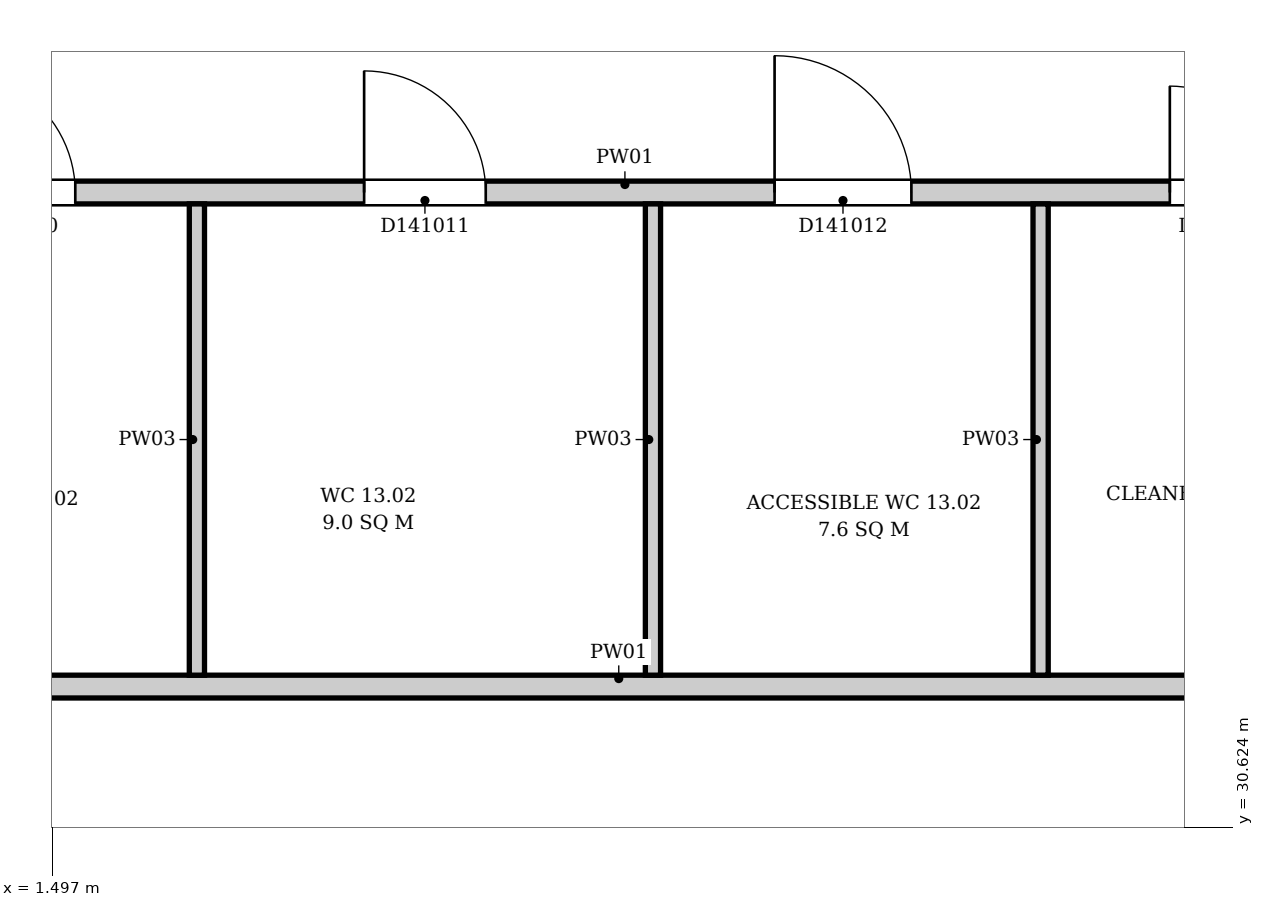
"""IFC4 building model, lengths in metres.
Left out: names, types, materials, properties, quantities, classifications, styles, units other than length and angle.
Written with IfcOpenShell. Run it as: python <this file> out.ifc"""

import sys

from ifc_helpers import new_model, si_unit, direction, frame, frame_2d, origin, place, context, subcontext, project, spatial, rectangle, extrude, element, fill, save


model = new_model("IFC4")
c1 = context("Model", 3, precision=1e-05, world=origin(), true_north=direction((0.0, 1.0)))
c2 = subcontext(c1, "Body", "Model", "MODEL_VIEW")
j1 = project(units=[si_unit("LENGTHUNIT", "METRE"), si_unit("PLANEANGLEUNIT", "RADIAN")], contexts=[c1])
p1 = place(None, origin())
s1 = spatial("IfcSite", under=j1, at=p1, CompositionType="ELEMENT")
p2 = place(p1, origin())
s2 = spatial("IfcBuilding", under=s1, at=p2, CompositionType="ELEMENT")
p3 = place(p2, frame((0.0, 0.0, 65.5)))
s3 = spatial("IfcBuildingStorey", under=s2, at=p3, CompositionType="ELEMENT", Elevation=65.5)
p4 = place(p3, frame((0.056, 31.55, 0.0), z_axis=(0.0, 0.0, 1.0), x_axis=(1.0, 0.0, 0.0)))
e1 = element("IfcWall", 1, at=p4, inside=s3, PredefinedType="PARTITIONING", context=c2, shape_type="SweptSolid", body=[
    extrude(rectangle(XDim=10.338, YDim=0.15, at=frame_2d((5.169, 0.0))), origin(), (0.0, 0.0, 1.0), 3.9),
])
p5 = place(p3, frame((0.056, 34.8, 0.0), z_axis=(0.0, 0.0, 1.0), x_axis=(1.0, 0.0, 0.0)))
e2 = element("IfcWall", 2, at=p5, inside=s3, PredefinedType="PARTITIONING", context=c2, shape_type="SweptSolid", body=[
    extrude(rectangle(XDim=10.419, YDim=0.15, at=frame_2d((5.209, 0.0))), origin(), (0.0, 0.0, 1.0), 3.9),
])
p6 = place(p5, frame((0.794, 0.0, 0.0)))
e3 = element("IfcOpeningElement", 3, at=p6, cuts=e2, PredefinedType="OPENING", context=c2, shape_type="SweptSolid", body=[
    extrude(rectangle(XDim=0.8, YDim=2.1, at=frame_2d((0.4, 1.05))), frame((0.0, 0.085, 0.0), z_axis=(0.0, -1.0, 0.0), x_axis=(1.0, 0.0, 0.0)), (0.0, 0.0, 1.0), 0.17),
])
p7 = place(p5, frame((3.494, 0.0, 0.0)))
e4 = element("IfcOpeningElement", 4, at=p7, cuts=e2, PredefinedType="OPENING", context=c2, shape_type="SweptSolid", body=[
    extrude(rectangle(XDim=0.8, YDim=2.1, at=frame_2d((0.4, 1.05))), frame((0.0, 0.085, 0.0), z_axis=(0.0, -1.0, 0.0), x_axis=(1.0, 0.0, 0.0)), (0.0, 0.0, 1.0), 0.17),
])
p8 = place(p5, frame((6.194, 0.0, 0.0)))
e5 = element("IfcOpeningElement", 5, at=p8, cuts=e2, PredefinedType="OPENING", context=c2, shape_type="SweptSolid", body=[
    extrude(rectangle(XDim=0.9, YDim=2.1, at=frame_2d((0.45, 1.05))), frame((0.0, 0.085, 0.0), z_axis=(0.0, -1.0, 0.0), x_axis=(1.0, 0.0, 0.0)), (0.0, 0.0, 1.0), 0.17),
])
p9 = place(p5, frame((8.794, 0.0, 0.0)))
e6 = element("IfcOpeningElement", 6, at=p9, cuts=e2, PredefinedType="OPENING", context=c2, shape_type="SweptSolid", body=[
    extrude(rectangle(XDim=0.7, YDim=2.1, at=frame_2d((0.35, 1.05))), frame((0.0, 0.085, 0.0), z_axis=(0.0, -1.0, 0.0), x_axis=(1.0, 0.0, 0.0)), (0.0, 0.0, 1.0), 0.17),
])
for number, where, z_axis, x_axis in (
    (7, (2.45, 31.625, 0.0), (0.0, 0.0, 1.0), (0.0, 1.0, 0.0)),
    (8, (5.45, 31.625, 0.0), (0.0, 0.0, 1.0), (0.0, 1.0, 0.0)),
    (9, (8.0, 31.625, 0.0), (0.0, 0.0, 1.0), (0.0, 1.0, 0.0)),
):
    element("IfcWall", number, at=place(p3, frame(where, z_axis=z_axis, x_axis=x_axis)), inside=s3, PredefinedType="PARTITIONING", context=c2, shape_type="SweptSolid", body=[
        extrude(rectangle(XDim=3.1, YDim=0.1, at=frame_2d((1.55, 0.0))), origin(), (0.0, 0.0, 1.0), 3.9),
    ])
p10 = place(p6, origin())
e10 = element("IfcDoor", 10, at=p10, inside=s3, OperationType="SINGLE_SWING_RIGHT", PredefinedType="DOOR", context=c2, shape_type="SweptSolid", body=[
    extrude(rectangle(XDim=0.8, YDim=2.1, at=frame_2d((0.4, 1.05))), frame((0.0, 0.025, 0.0), z_axis=(0.0, -1.0, 0.0), x_axis=(1.0, 0.0, 0.0)), (0.0, 0.0, 1.0), 0.05),
])
fill(e3, e10)
p11 = place(p7, origin())
e11 = element("IfcDoor", 11, at=p11, inside=s3, OperationType="SINGLE_SWING_LEFT", PredefinedType="DOOR", context=c2, shape_type="SweptSolid", body=[
    extrude(rectangle(XDim=0.8, YDim=2.1, at=frame_2d((0.4, 1.05))), frame((0.0, 0.025, 0.0), z_axis=(0.0, -1.0, 0.0), x_axis=(1.0, 0.0, 0.0)), (0.0, 0.0, 1.0), 0.05),
])
fill(e4, e11)
p12 = place(p8, origin())
e12 = element("IfcDoor", 12, at=p12, inside=s3, OperationType="SINGLE_SWING_LEFT", PredefinedType="DOOR", context=c2, shape_type="SweptSolid", body=[
    extrude(rectangle(XDim=0.9, YDim=2.1, at=frame_2d((0.45, 1.05))), frame((0.0, 0.025, 0.0), z_axis=(0.0, -1.0, 0.0), x_axis=(1.0, 0.0, 0.0)), (0.0, 0.0, 1.0), 0.05),
])
fill(e5, e12)
p13 = place(p9, origin())
e13 = element("IfcDoor", 13, at=p13, inside=s3, OperationType="SINGLE_SWING_LEFT", PredefinedType="DOOR", context=c2, shape_type="SweptSolid", body=[
    extrude(rectangle(XDim=0.7, YDim=2.1, at=frame_2d((0.35, 1.05))), frame((0.0, 0.025, 0.0), z_axis=(0.0, -1.0, 0.0), x_axis=(1.0, 0.0, 0.0)), (0.0, 0.0, 1.0), 0.05),
])
fill(e6, e13)
save(model, sys.argv[1])
